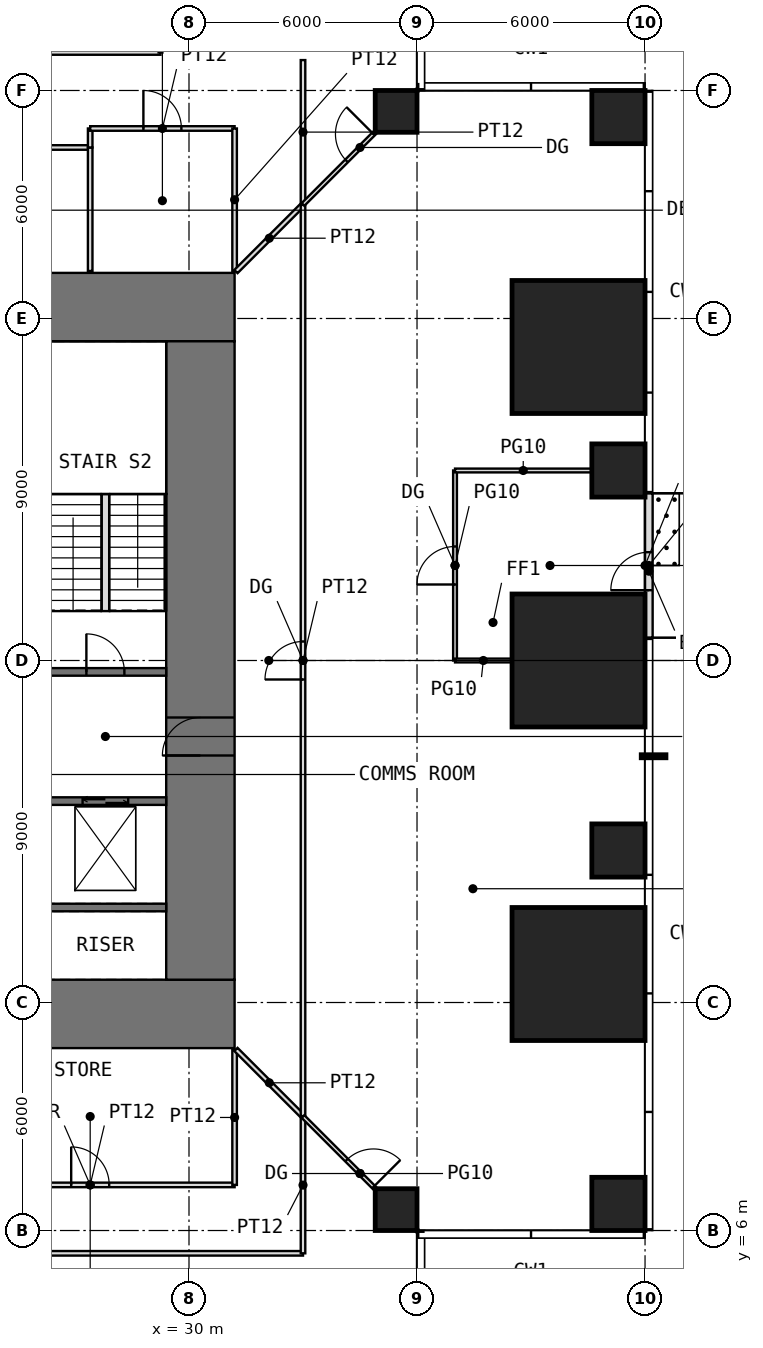
"""IFC4 building model, lengths in metres.
Left out: names, types, materials, properties, quantities, classifications, styles, units other than length and angle.
Written with IfcOpenShell. Run it as: python <this file> out.ifc"""

import sys

from ifc_helpers import new_model, si_unit, direction, frame, frame_2d, origin, origin_2d, place, context, subcontext, project, spatial, rectangle, extrude, element, fill, save


model = new_model("IFC4")
c1 = context("Model", 3, precision=1e-05, world=origin(), true_north=direction((0.0, 1.0)))
c2 = subcontext(c1, "Body", "Model", "MODEL_VIEW")
j1 = project(units=[si_unit("LENGTHUNIT", "METRE"), si_unit("PLANEANGLEUNIT", "RADIAN")], contexts=[c1])
p1 = place(None, origin())
s1 = spatial("IfcSite", under=j1, at=p1, CompositionType="ELEMENT")
p2 = place(p1, origin())
s2 = spatial("IfcBuilding", under=s1, at=p2, CompositionType="ELEMENT")
p3 = place(p2, frame((0.0, 0.0, 38.5)))
s3 = spatial("IfcBuildingStorey", under=s2, at=p3, CompositionType="ELEMENT", Elevation=38.5)
p4 = place(p3, frame((35.45, 6.55, 0.0), z_axis=(0.0, 0.0, 1.0), x_axis=(1.0, 0.0, 0.0)))
e1 = element("IfcColumn", 1, at=p4, inside=s3, PredefinedType="COLUMN", context=c2, shape_type="SweptSolid", body=[
    extrude(rectangle(XDim=1.1, YDim=1.1, at=origin_2d()), origin(), (0.0, 0.0, 1.0), 4.0),
])
p5 = place(p3, frame((41.3, 6.7, 0.0), z_axis=(0.0, 0.0, 1.0), x_axis=(1.0, 0.0, 0.0)))
e2 = element("IfcColumn", 2, at=p5, inside=s3, PredefinedType="COLUMN", context=c2, shape_type="SweptSolid", body=[
    extrude(rectangle(XDim=1.4, YDim=1.4, at=origin_2d()), origin(), (0.0, 0.0, 1.0), 4.0),
])
p6 = place(p3, frame((40.25, 12.75, 0.0), z_axis=(0.0, 0.0, 1.0), x_axis=(1.0, 0.0, 0.0)))
e3 = element("IfcColumn", 3, at=p6, inside=s3, PredefinedType="COLUMN", context=c2, shape_type="SweptSolid", body=[
    extrude(rectangle(XDim=3.5, YDim=3.5, at=origin_2d()), origin(), (0.0, 0.0, 1.0), 4.0),
])
p7 = place(p3, frame((41.3, 16.0, 0.0), z_axis=(0.0, 0.0, 1.0), x_axis=(1.0, 0.0, 0.0)))
e4 = element("IfcColumn", 4, at=p7, inside=s3, PredefinedType="COLUMN", context=c2, shape_type="SweptSolid", body=[
    extrude(rectangle(XDim=1.4, YDim=1.4, at=origin_2d()), origin(), (0.0, 0.0, 1.0), 4.0),
])
p8 = place(p3, frame((40.25, 21.0, 0.0), z_axis=(0.0, 0.0, 1.0), x_axis=(1.0, 0.0, 0.0)))
e5 = element("IfcColumn", 5, at=p8, inside=s3, PredefinedType="COLUMN", context=c2, shape_type="SweptSolid", body=[
    extrude(rectangle(XDim=3.5, YDim=3.5, at=origin_2d()), origin(), (0.0, 0.0, 1.0), 4.0),
])
p9 = place(p3, frame((41.3, 26.0, 0.0), z_axis=(0.0, 0.0, 1.0), x_axis=(1.0, 0.0, 0.0)))
e6 = element("IfcColumn", 6, at=p9, inside=s3, PredefinedType="COLUMN", context=c2, shape_type="SweptSolid", body=[
    extrude(rectangle(XDim=1.4, YDim=1.4, at=origin_2d()), origin(), (0.0, 0.0, 1.0), 4.0),
])
p10 = place(p3, frame((40.25, 29.25, 0.0), z_axis=(0.0, 0.0, 1.0), x_axis=(1.0, 0.0, 0.0)))
e7 = element("IfcColumn", 7, at=p10, inside=s3, PredefinedType="COLUMN", context=c2, shape_type="SweptSolid", body=[
    extrude(rectangle(XDim=3.5, YDim=3.5, at=origin_2d()), origin(), (0.0, 0.0, 1.0), 4.0),
])
p11 = place(p3, frame((35.45, 35.45, 0.0), z_axis=(0.0, 0.0, 1.0), x_axis=(1.0, 0.0, 0.0)))
e8 = element("IfcColumn", 8, at=p11, inside=s3, PredefinedType="COLUMN", context=c2, shape_type="SweptSolid", body=[
    extrude(rectangle(XDim=1.1, YDim=1.1, at=origin_2d()), origin(), (0.0, 0.0, 1.0), 4.0),
])
p12 = place(p3, frame((41.3, 35.3, 0.0), z_axis=(0.0, 0.0, 1.0), x_axis=(1.0, 0.0, 0.0)))
e9 = element("IfcColumn", 9, at=p12, inside=s3, PredefinedType="COLUMN", context=c2, shape_type="SweptSolid", body=[
    extrude(rectangle(XDim=1.4, YDim=1.4, at=origin_2d()), origin(), (0.0, 0.0, 1.0), 4.0),
])
p13 = place(p3, frame((42.1, 21.6, 0.0), z_axis=(0.0, 0.0, 1.0), x_axis=(0.0, 1.0, 0.0)))
e10 = element("IfcWall", 10, at=p13, inside=s3, PredefinedType="USERDEFINED", context=c2, shape_type="SweptSolid", body=[
    extrude(rectangle(XDim=3.8, YDim=0.2, at=frame_2d((1.9, 0.0))), origin(), (0.0, 0.0, 1.0), 3.75),
])
p14 = place(p13, frame((1.25, 0.0, 0.0)))
e11 = element("IfcOpeningElement", 11, at=p14, cuts=e10, PredefinedType="OPENING", context=c2, shape_type="SweptSolid", body=[
    extrude(rectangle(XDim=1.0, YDim=2.4, at=frame_2d((0.5, 1.2))), frame((0.0, 0.11, 0.0), z_axis=(0.0, -1.0, 0.0), x_axis=(1.0, 0.0, 0.0)), (0.0, 0.0, 1.0), 0.22),
])
p15 = place(p3, frame((10.8, 11.7, -0.05), z_axis=(0.0, 0.0, 1.0), x_axis=(1.0, 0.0, 0.0)))
e12 = element("IfcWall", 12, at=p15, inside=s3, PredefinedType="SHEAR", context=c2, shape_type="SweptSolid", body=[
    extrude(rectangle(XDim=20.4, YDim=1.8, at=frame_2d((10.2, 0.0))), origin(), (0.0, 0.0, 1.0), 4.0),
])
p16 = place(p15, frame((9.2, 0.0, 0.05)))
e13 = element("IfcOpeningElement", 13, at=p16, cuts=e12, PredefinedType="OPENING", context=c2, shape_type="SweptSolid", body=[
    extrude(rectangle(XDim=2.0, YDim=2.2, at=frame_2d((1.0, 1.1))), frame((0.0, 0.91, 0.0), z_axis=(0.0, -1.0, 0.0), x_axis=(1.0, 0.0, 0.0)), (0.0, 0.0, 1.0), 1.82),
])
p17 = place(p3, frame((10.8, 30.3, -0.05), z_axis=(0.0, 0.0, 1.0), x_axis=(1.0, 0.0, 0.0)))
e14 = element("IfcWall", 14, at=p17, inside=s3, PredefinedType="SHEAR", context=c2, shape_type="SweptSolid", body=[
    extrude(rectangle(XDim=20.4, YDim=1.8, at=frame_2d((10.2, 0.0))), origin(), (0.0, 0.0, 1.0), 4.0),
])
p18 = place(p17, frame((9.2, 0.0, 0.05)))
e15 = element("IfcOpeningElement", 15, at=p18, cuts=e14, PredefinedType="OPENING", context=c2, shape_type="SweptSolid", body=[
    extrude(rectangle(XDim=2.0, YDim=2.2, at=frame_2d((1.0, 1.1))), frame((0.0, 0.91, 0.0), z_axis=(0.0, -1.0, 0.0), x_axis=(1.0, 0.0, 0.0)), (0.0, 0.0, 1.0), 1.82),
])
p19 = place(p3, frame((30.3, 12.6, -0.05), z_axis=(0.0, 0.0, 1.0), x_axis=(0.0, 1.0, 0.0)))
e16 = element("IfcWall", 16, at=p19, inside=s3, PredefinedType="SHEAR", context=c2, shape_type="SweptSolid", body=[
    extrude(rectangle(XDim=16.8, YDim=1.8, at=frame_2d((8.4, 0.0))), origin(), (0.0, 0.0, 1.0), 4.0),
])
p20 = place(p19, frame((5.9, 0.0, 0.05)))
e17 = element("IfcOpeningElement", 17, at=p20, cuts=e16, PredefinedType="OPENING", context=c2, shape_type="SweptSolid", body=[
    extrude(rectangle(XDim=1.0, YDim=2.2, at=frame_2d((0.5, 1.1))), frame((0.0, 0.91, 0.0), z_axis=(0.0, -1.0, 0.0), x_axis=(1.0, 0.0, 0.0)), (0.0, 0.0, 1.0), 1.82),
])
p21 = place(p3, frame((26.2, 14.5, -0.05), z_axis=(0.0, 0.0, 1.0), x_axis=(1.0, 0.0, 0.0)))
e18 = element("IfcWall", 18, at=p21, inside=s3, PredefinedType="SHEAR", context=c2, shape_type="SweptSolid", body=[
    extrude(rectangle(XDim=3.2, YDim=0.2, at=frame_2d((1.6, 0.0))), origin(), (0.0, 0.0, 1.0), 4.0),
])
p22 = place(p3, frame((26.2, 17.3, -0.05), z_axis=(0.0, 0.0, 1.0), x_axis=(1.0, 0.0, 0.0)))
e19 = element("IfcWall", 19, at=p22, inside=s3, PredefinedType="SHEAR", context=c2, shape_type="SweptSolid", body=[
    extrude(rectangle(XDim=3.2, YDim=0.2, at=frame_2d((1.6, 0.0))), origin(), (0.0, 0.0, 1.0), 4.0),
])
p23 = place(p22, frame((1.0, 0.0, 0.05)))
e20 = element("IfcOpeningElement", 20, at=p23, cuts=e19, PredefinedType="OPENING", context=c2, shape_type="SweptSolid", body=[
    extrude(rectangle(XDim=1.2, YDim=2.2, at=frame_2d((0.6, 1.1))), frame((0.0, 0.11, 0.0), z_axis=(0.0, -1.0, 0.0), x_axis=(1.0, 0.0, 0.0)), (0.0, 0.0, 1.0), 0.22),
])
p24 = place(p3, frame((26.2, 20.7, -0.05), z_axis=(0.0, 0.0, 1.0), x_axis=(1.0, 0.0, 0.0)))
e21 = element("IfcWall", 21, at=p24, inside=s3, PredefinedType="SHEAR", context=c2, shape_type="SweptSolid", body=[
    extrude(rectangle(XDim=3.2, YDim=0.2, at=frame_2d((1.6, 0.0))), origin(), (0.0, 0.0, 1.0), 4.0),
])
p25 = place(p24, frame((1.1, 0.0, 0.05)))
e22 = element("IfcOpeningElement", 22, at=p25, cuts=e21, PredefinedType="OPENING", context=c2, shape_type="SweptSolid", body=[
    extrude(rectangle(XDim=1.0, YDim=2.2, at=frame_2d((0.5, 1.1))), frame((0.0, 0.11, 0.0), z_axis=(0.0, -1.0, 0.0), x_axis=(1.0, 0.0, 0.0)), (0.0, 0.0, 1.0), 0.22),
])
p26 = place(p3, frame((6.0, 5.4, 0.0), z_axis=(0.0, 0.0, 1.0), x_axis=(1.0, 0.0, 0.0)))
e23 = element("IfcWall", 23, at=p26, inside=s3, PredefinedType="PARTITIONING", context=c2, shape_type="SweptSolid", body=[
    extrude(rectangle(XDim=27.0, YDim=0.12, at=frame_2d((13.5, 0.0))), origin(), (0.0, 0.0, 1.0), 3.75),
])
p27 = place(p26, frame((14.8, 0.0, 0.0)))
e24 = element("IfcOpeningElement", 24, at=p27, cuts=e23, PredefinedType="OPENING", context=c2, shape_type="SweptSolid", body=[
    extrude(rectangle(XDim=1.0, YDim=2.4, at=frame_2d((0.5, 1.2))), frame((0.0, 0.07, 0.0), z_axis=(0.0, -1.0, 0.0), x_axis=(1.0, 0.0, 0.0)), (0.0, 0.0, 1.0), 0.14),
])
p28 = place(p3, frame((21.0, 37.0, 0.0), z_axis=(0.0, 0.0, 1.0), x_axis=(1.0, 0.0, 0.0)))
e25 = element("IfcWall", 25, at=p28, inside=s3, PredefinedType="PARTITIONING", context=c2, shape_type="SweptSolid", body=[
    extrude(rectangle(XDim=8.25, YDim=0.12, at=frame_2d((4.125, 0.0))), origin(), (0.0, 0.0, 1.0), 3.75),
])
p29 = place(p28, frame((3.225, 0.0, 0.0)))
e26 = element("IfcOpeningElement", 26, at=p29, cuts=e25, PredefinedType="OPENING", context=c2, shape_type="SweptSolid", body=[
    extrude(rectangle(XDim=1.8, YDim=2.4, at=frame_2d((0.9, 1.2))), frame((0.0, 0.07, 0.0), z_axis=(0.0, -1.0, 0.0), x_axis=(1.0, 0.0, 0.0)), (0.0, 0.0, 1.0), 0.14),
])
p30 = place(p3, frame((23.6, 7.2, 0.0), z_axis=(0.0, 0.0, 1.0), x_axis=(1.0, 0.0, 0.0)))
e27 = element("IfcWall", 27, at=p30, inside=s3, PredefinedType="PARTITIONING", context=c2, shape_type="SweptSolid", body=[
    extrude(rectangle(XDim=7.6, YDim=0.12, at=frame_2d((3.8, 0.0))), origin(), (0.0, 0.0, 1.0), 3.75),
])
p31 = place(p30, frame((3.3, 0.0, 0.0)))
e28 = element("IfcOpeningElement", 28, at=p31, cuts=e27, PredefinedType="OPENING", context=c2, shape_type="SweptSolid", body=[
    extrude(rectangle(XDim=1.0, YDim=2.2, at=frame_2d((0.5, 1.1))), frame((0.0, 0.07, 0.0), z_axis=(0.0, -1.0, 0.0), x_axis=(1.0, 0.0, 0.0)), (0.0, 0.0, 1.0), 0.14),
])
p32 = place(p3, frame((23.6, 34.5, 0.0), z_axis=(0.0, 0.0, 1.0), x_axis=(1.0, 0.0, 0.0)))
e29 = element("IfcWall", 29, at=p32, inside=s3, PredefinedType="PARTITIONING", context=c2, shape_type="SweptSolid", body=[
    extrude(rectangle(XDim=3.8, YDim=0.12, at=frame_2d((1.9, 0.0))), origin(), (0.0, 0.0, 1.0), 3.75),
])
p33 = place(p32, frame((1.4, 0.0, 0.0)))
e30 = element("IfcOpeningElement", 30, at=p33, cuts=e29, PredefinedType="OPENING", context=c2, shape_type="SweptSolid", body=[
    extrude(rectangle(XDim=1.0, YDim=2.2, at=frame_2d((0.5, 1.1))), frame((0.0, 0.07, 0.0), z_axis=(0.0, -1.0, 0.0), x_axis=(1.0, 0.0, 0.0)), (0.0, 0.0, 1.0), 0.14),
])
p34 = place(p3, frame((27.4, 31.25, 0.0), z_axis=(0.0, 0.0, 1.0), x_axis=(0.0, 1.0, 0.0)))
e31 = element("IfcWall", 31, at=p34, inside=s3, PredefinedType="PARTITIONING", context=c2, shape_type="SweptSolid", body=[
    extrude(rectangle(XDim=3.25, YDim=0.12, at=frame_2d((1.625, 0.0))), origin(), (0.0, 0.0, 1.0), 3.75),
])
p35 = place(p3, frame((27.4, 34.5, 0.0), z_axis=(0.0, 0.0, 1.0), x_axis=(0.0, 1.0, 0.0)))
e32 = element("IfcWall", 32, at=p35, inside=s3, PredefinedType="PARTITIONING", context=c2, shape_type="SweptSolid", body=[
    extrude(rectangle(XDim=0.5, YDim=0.12, at=frame_2d((0.25, 0.0))), origin(), (0.0, 0.0, 1.0), 3.75),
])
p36 = place(p3, frame((27.4, 35.0, 0.0), z_axis=(0.0, 0.0, 1.0), x_axis=(1.0, 0.0, 0.0)))
e33 = element("IfcWall", 33, at=p36, inside=s3, PredefinedType="PARTITIONING", context=c2, shape_type="SweptSolid", body=[
    extrude(rectangle(XDim=3.8, YDim=0.12, at=frame_2d((1.9, 0.0))), origin(), (0.0, 0.0, 1.0), 3.75),
])
p37 = place(p36, frame((1.4, 0.0, 0.0)))
e34 = element("IfcOpeningElement", 34, at=p37, cuts=e33, PredefinedType="OPENING", context=c2, shape_type="SweptSolid", body=[
    extrude(rectangle(XDim=1.0, YDim=2.4, at=frame_2d((0.5, 1.2))), frame((0.0, 0.07, 0.0), z_axis=(0.0, -1.0, 0.0), x_axis=(1.0, 0.0, 0.0)), (0.0, 0.0, 1.0), 0.14),
])
p38 = place(p3, frame((31.2, 7.2, 0.0), z_axis=(0.0, 0.0, 1.0), x_axis=(0.0, 1.0, 0.0)))
e35 = element("IfcWall", 35, at=p38, inside=s3, PredefinedType="PARTITIONING", context=c2, shape_type="SweptSolid", body=[
    extrude(rectangle(XDim=3.55, YDim=0.12, at=frame_2d((1.775, 0.0))), origin(), (0.0, 0.0, 1.0), 3.75),
])
p39 = place(p3, frame((31.2, 31.25, 0.0), z_axis=(0.0, 0.0, 1.0), x_axis=(0.0, 1.0, 0.0)))
e36 = element("IfcWall", 36, at=p39, inside=s3, PredefinedType="PARTITIONING", context=c2, shape_type="SweptSolid", body=[
    extrude(rectangle(XDim=3.75, YDim=0.12, at=frame_2d((1.875, 0.0))), origin(), (0.0, 0.0, 1.0), 3.75),
])
for number, where, z_axis, x_axis in (
    (37, (31.235, 10.765, 0.0), (0.0, 0.0, 1.0), (0.707, -0.707, 0.0)),
    (38, (31.235, 31.235, 0.0), (0.0, 0.0, 1.0), (0.707, 0.707, 0.0)),
):
    element("IfcWall", number, at=place(p3, frame(where, z_axis=z_axis, x_axis=x_axis)), inside=s3, PredefinedType="PARTITIONING", context=c2, shape_type="SweptSolid", body=[
        extrude(rectangle(XDim=2.481, YDim=0.12, at=frame_2d((1.241, 0.0))), origin(), (0.0, 0.0, 1.0), 3.75),
    ])
p40 = place(p3, frame((33.0, 5.4, 0.0), z_axis=(0.0, 0.0, 1.0), x_axis=(0.0, 1.0, 0.0)))
e39 = element("IfcWall", 39, at=p40, inside=s3, PredefinedType="PARTITIONING", context=c2, shape_type="SweptSolid", body=[
    extrude(rectangle(XDim=3.59, YDim=0.12, at=frame_2d((1.795, 0.0))), origin(), (0.0, 0.0, 1.0), 3.75),
])
p41 = place(p3, frame((33.0, 9.01, 0.0), z_axis=(0.0, 0.0, 1.0), x_axis=(0.0, 1.0, 0.0)))
e40 = element("IfcWall", 40, at=p41, inside=s3, PredefinedType="PARTITIONING", context=c2, shape_type="SweptSolid", body=[
    extrude(rectangle(XDim=23.98, YDim=0.12, at=frame_2d((11.99, 0.0))), origin(), (0.0, 0.0, 1.0), 3.75),
])
p42 = place(p41, frame((11.49, 0.0, 0.0)))
e41 = element("IfcOpeningElement", 41, at=p42, cuts=e40, PredefinedType="OPENING", context=c2, shape_type="SweptSolid", body=[
    extrude(rectangle(XDim=1.0, YDim=2.4, at=frame_2d((0.5, 1.2))), frame((0.0, 0.07, 0.0), z_axis=(0.0, -1.0, 0.0), x_axis=(1.0, 0.0, 0.0)), (0.0, 0.0, 1.0), 0.14),
])
p43 = place(p3, frame((33.0, 33.01, 0.0), z_axis=(0.0, 0.0, 1.0), x_axis=(0.0, 1.0, 0.0)))
e42 = element("IfcWall", 42, at=p43, inside=s3, PredefinedType="PARTITIONING", context=c2, shape_type="SweptSolid", body=[
    extrude(rectangle(XDim=3.79, YDim=0.12, at=frame_2d((1.895, 0.0))), origin(), (0.0, 0.0, 1.0), 3.75),
])
p44 = place(p3, frame((37.0, 21.0, 0.0), z_axis=(0.0, 0.0, 1.0), x_axis=(0.0, 1.0, 0.0)))
e43 = element("IfcWall", 43, at=p44, inside=s3, PredefinedType="PARTITIONING", context=c2, shape_type="SweptSolid", body=[
    extrude(rectangle(XDim=5.0, YDim=0.1, at=frame_2d((2.5, 0.0))), origin(), (0.0, 0.0, 1.0), 3.75),
])
p45 = place(p44, frame((2.0, 0.0, 0.0)))
e44 = element("IfcOpeningElement", 44, at=p45, cuts=e43, PredefinedType="OPENING", context=c2, shape_type="SweptSolid", body=[
    extrude(rectangle(XDim=1.0, YDim=2.4, at=frame_2d((0.5, 1.2))), frame((0.0, 0.06, 0.0), z_axis=(0.0, -1.0, 0.0), x_axis=(1.0, 0.0, 0.0)), (0.0, 0.0, 1.0), 0.12),
])
p46 = place(p3, frame((37.0, 21.0, 0.0), z_axis=(0.0, 0.0, 1.0), x_axis=(1.0, 0.0, 0.0)))
e45 = element("IfcWall", 45, at=p46, inside=s3, PredefinedType="PARTITIONING", context=c2, shape_type="SweptSolid", body=[
    extrude(rectangle(XDim=1.49, YDim=0.1, at=frame_2d((0.745, 0.0))), origin(), (0.0, 0.0, 1.0), 3.75),
])
p47 = place(p3, frame((37.0, 26.0, 0.0), z_axis=(0.0, 0.0, 1.0), x_axis=(1.0, 0.0, 0.0)))
e46 = element("IfcWall", 46, at=p47, inside=s3, PredefinedType="PARTITIONING", context=c2, shape_type="SweptSolid", body=[
    extrude(rectangle(XDim=3.59, YDim=0.1, at=frame_2d((1.795, 0.0))), origin(), (0.0, 0.0, 1.0), 3.75),
])
p48 = place(p3, frame((33.0, 9.0, 0.0), z_axis=(0.0, 0.0, 1.0), x_axis=(0.707106781187, -0.707106781187, 0.0)))
e47 = element("IfcWall", 47, at=p48, inside=s3, PredefinedType="PARTITIONING", context=c2, shape_type="SweptSolid", body=[
    extrude(rectangle(XDim=4.243, YDim=0.1, at=frame_2d((2.121, 0.0))), origin(), (0.0, 0.0, 1.0), 3.75),
])
p49 = place(p48, frame((1.621, 0.0, 0.0)))
e48 = element("IfcOpeningElement", 48, at=p49, cuts=e47, PredefinedType="OPENING", context=c2, shape_type="SweptSolid", body=[
    extrude(rectangle(XDim=1.0, YDim=2.4, at=frame_2d((0.5, 1.2))), frame((0.0, 0.06, 0.0), z_axis=(0.0, -1.0, 0.0), x_axis=(1.0, 0.0, 0.0)), (0.0, 0.0, 1.0), 0.12),
])
p50 = place(p3, frame((33.0, 33.0, 0.0), z_axis=(0.0, 0.0, 1.0), x_axis=(0.707106781187, 0.707106781187, 0.0)))
e49 = element("IfcWall", 49, at=p50, inside=s3, PredefinedType="PARTITIONING", context=c2, shape_type="SweptSolid", body=[
    extrude(rectangle(XDim=4.243, YDim=0.1, at=frame_2d((2.121, 0.0))), origin(), (0.0, 0.0, 1.0), 3.75),
])
p51 = place(p50, frame((1.621, 0.0, 0.0)))
e50 = element("IfcOpeningElement", 50, at=p51, cuts=e49, PredefinedType="OPENING", context=c2, shape_type="SweptSolid", body=[
    extrude(rectangle(XDim=1.0, YDim=2.4, at=frame_2d((0.5, 1.2))), frame((0.0, 0.06, 0.0), z_axis=(0.0, -1.0, 0.0), x_axis=(1.0, 0.0, 0.0)), (0.0, 0.0, 1.0), 0.12),
])
p52 = place(p3, frame((27.8, 22.3, 0.0), z_axis=(0.0, 0.0, 1.0), x_axis=(0.0, 1.0, 0.0)))
e51 = element("IfcWall", 51, at=p52, inside=s3, PredefinedType="PARTITIONING", context=c2, shape_type="SweptSolid", body=[
    extrude(rectangle(XDim=3.08, YDim=0.2, at=frame_2d((1.54, 0.0))), origin(), (0.0, 0.0, 1.0), 4.0),
])
p53 = place(p14, origin())
e52 = element("IfcDoor", 52, at=p53, inside=s3, OperationType="SINGLE_SWING_LEFT", PredefinedType="DOOR", context=c2, shape_type="SweptSolid", body=[
    extrude(rectangle(XDim=1.0, YDim=2.4, at=frame_2d((0.5, 1.2))), frame((0.0, 0.025, 0.0), z_axis=(0.0, -1.0, 0.0), x_axis=(1.0, 0.0, 0.0)), (0.0, 0.0, 1.0), 0.05),
])
fill(e11, e52)
p54 = place(p20, origin())
e53 = element("IfcDoor", 53, at=p54, inside=s3, OperationType="SINGLE_SWING_LEFT", PredefinedType="DOOR", context=c2, shape_type="SweptSolid", body=[
    extrude(rectangle(XDim=1.0, YDim=2.2, at=frame_2d((0.5, 1.1))), frame((0.0, 0.025, 0.0), z_axis=(0.0, -1.0, 0.0), x_axis=(1.0, 0.0, 0.0)), (0.0, 0.0, 1.0), 0.05),
])
fill(e17, e53)
p55 = place(p25, origin())
e54 = element("IfcDoor", 54, at=p55, inside=s3, OperationType="SINGLE_SWING_LEFT", PredefinedType="DOOR", context=c2, shape_type="SweptSolid", body=[
    extrude(rectangle(XDim=1.0, YDim=2.2, at=frame_2d((0.5, 1.1))), frame((0.0, 0.025, 0.0), z_axis=(0.0, -1.0, 0.0), x_axis=(1.0, 0.0, 0.0)), (0.0, 0.0, 1.0), 0.05),
])
fill(e22, e54)
p56 = place(p31, origin())
e55 = element("IfcDoor", 55, at=p56, inside=s3, OperationType="SINGLE_SWING_LEFT", PredefinedType="DOOR", context=c2, shape_type="SweptSolid", body=[
    extrude(rectangle(XDim=1.0, YDim=2.2, at=frame_2d((0.5, 1.1))), frame((0.0, 0.025, 0.0), z_axis=(0.0, -1.0, 0.0), x_axis=(1.0, 0.0, 0.0)), (0.0, 0.0, 1.0), 0.05),
])
fill(e28, e55)
p57 = place(p45, origin())
e56 = element("IfcDoor", 56, at=p57, inside=s3, OperationType="SINGLE_SWING_LEFT", PredefinedType="DOOR", context=c2, shape_type="SweptSolid", body=[
    extrude(rectangle(XDim=1.0, YDim=2.4, at=frame_2d((0.5, 1.2))), frame((0.0, 0.025, 0.0), z_axis=(0.0, -1.0, 0.0), x_axis=(1.0, 0.0, 0.0)), (0.0, 0.0, 1.0), 0.05),
])
fill(e44, e56)
p58 = place(p37, origin())
e57 = element("IfcDoor", 57, at=p58, inside=s3, OperationType="SINGLE_SWING_LEFT", PredefinedType="DOOR", context=c2, shape_type="SweptSolid", body=[
    extrude(rectangle(XDim=1.0, YDim=2.4, at=frame_2d((0.5, 1.2))), frame((0.0, 0.025, 0.0), z_axis=(0.0, -1.0, 0.0), x_axis=(1.0, 0.0, 0.0)), (0.0, 0.0, 1.0), 0.05),
])
fill(e34, e57)
p59 = place(p42, origin())
e58 = element("IfcDoor", 58, at=p59, inside=s3, OperationType="SINGLE_SWING_LEFT", PredefinedType="DOOR", context=c2, shape_type="SweptSolid", body=[
    extrude(rectangle(XDim=1.0, YDim=2.4, at=frame_2d((0.5, 1.2))), frame((0.0, 0.025, 0.0), z_axis=(0.0, -1.0, 0.0), x_axis=(1.0, 0.0, 0.0)), (0.0, 0.0, 1.0), 0.05),
])
fill(e41, e58)
p60 = place(p49, origin())
e59 = element("IfcDoor", 59, at=p60, inside=s3, OperationType="SINGLE_SWING_RIGHT", PredefinedType="DOOR", context=c2, shape_type="SweptSolid", body=[
    extrude(rectangle(XDim=1.0, YDim=2.4, at=frame_2d((0.5, 1.2))), frame((0.0, 0.025, 0.0), z_axis=(0.0, -1.0, 0.0), x_axis=(1.0, 0.0, 0.0)), (0.0, 0.0, 1.0), 0.05),
])
fill(e48, e59)
p61 = place(p51, origin())
e60 = element("IfcDoor", 60, at=p61, inside=s3, OperationType="SINGLE_SWING_RIGHT", PredefinedType="DOOR", context=c2, shape_type="SweptSolid", body=[
    extrude(rectangle(XDim=1.0, YDim=2.4, at=frame_2d((0.5, 1.2))), frame((0.0, 0.025, 0.0), z_axis=(0.0, -1.0, 0.0), x_axis=(1.0, 0.0, 0.0)), (0.0, 0.0, 1.0), 0.05),
])
fill(e50, e60)
p62 = place(p23, origin())
e61 = element("IfcDoor", 61, at=p62, inside=s3, OperationType="DOUBLE_DOOR_SLIDING", PredefinedType="DOOR", context=c2, shape_type="SweptSolid", body=[
    extrude(rectangle(XDim=1.2, YDim=2.2, at=frame_2d((0.6, 1.1))), frame((0.0, 0.025, 0.0), z_axis=(0.0, -1.0, 0.0), x_axis=(1.0, 0.0, 0.0)), (0.0, 0.0, 1.0), 0.05),
])
fill(e20, e61)
save(model, sys.argv[1])
